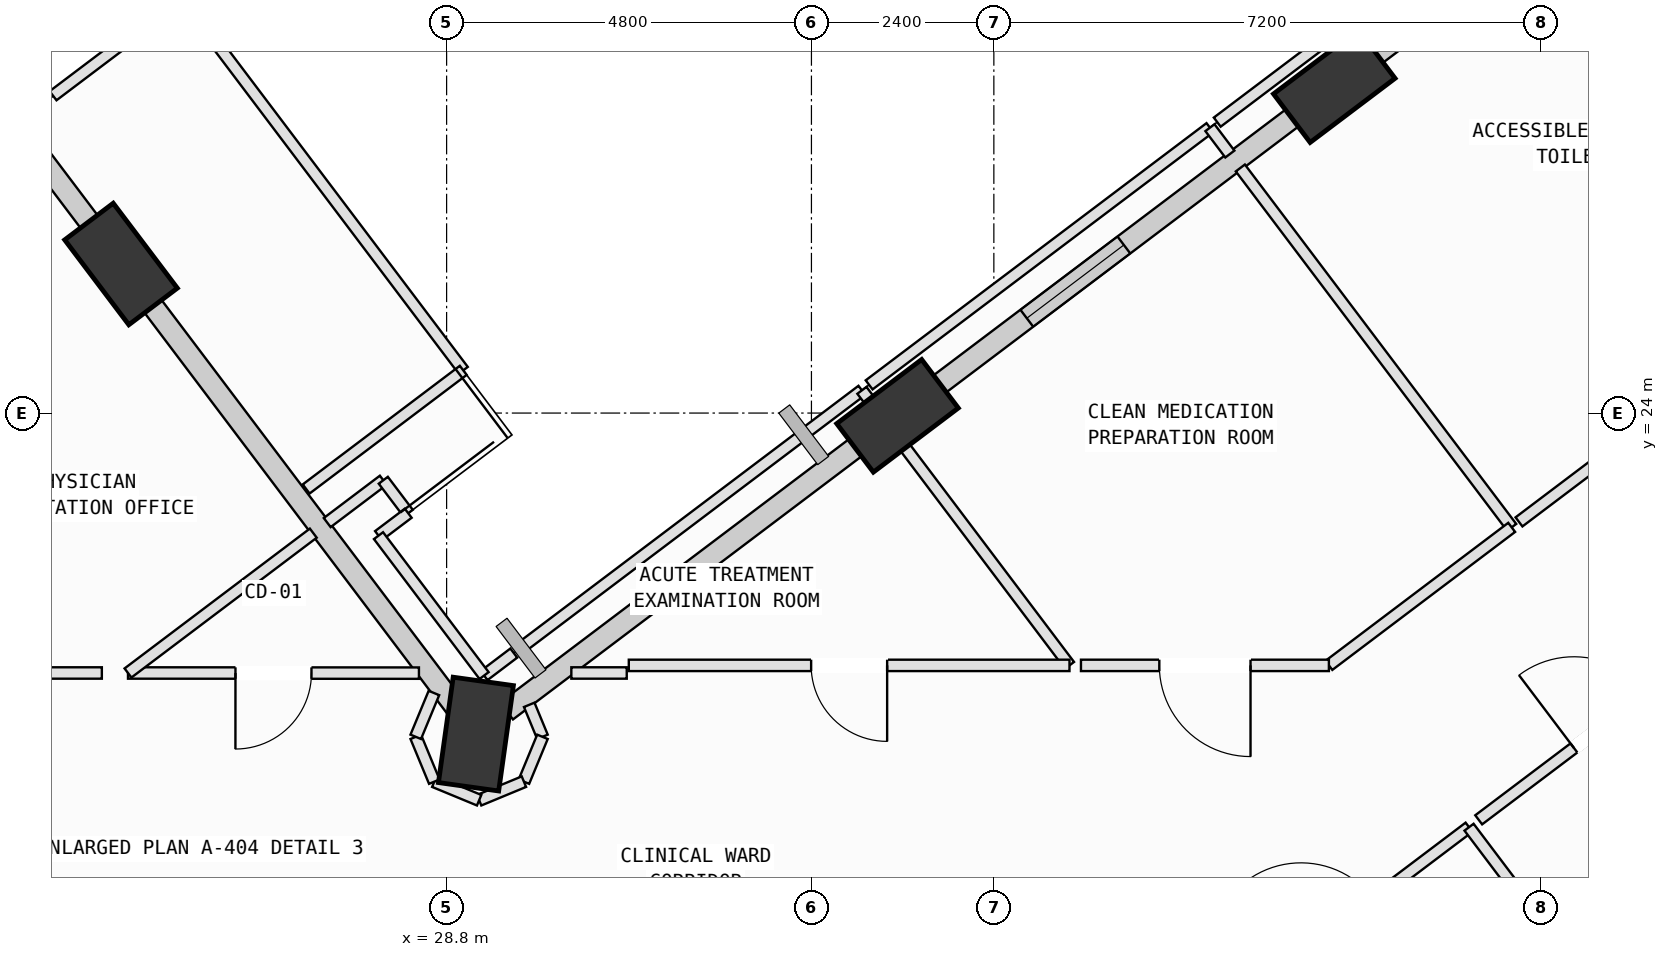
"""IFC4 building model, lengths in metres.
Left out: names, types, materials, properties, quantities, classifications, styles, units other than length and angle.
Written with IfcOpenShell. Run it as: python <this file> out.ifc"""

import sys

from ifc_helpers import new_model, si_unit, direction, frame, frame_2d, origin, origin_2d, place, context, subcontext, project, spatial, rectangle, extrude, element, fill, save


model = new_model("IFC4")
c1 = context("Model", 3, precision=1e-05, world=origin(), true_north=direction((0.0, 1.0)))
c2 = subcontext(c1, "Body", "Model", "MODEL_VIEW")
j1 = project(units=[si_unit("LENGTHUNIT", "METRE"), si_unit("PLANEANGLEUNIT", "RADIAN")], contexts=[c1])
p1 = place(None, origin())
s1 = spatial("IfcSite", under=j1, at=p1, CompositionType="ELEMENT")
p2 = place(p1, origin())
s2 = spatial("IfcBuilding", under=s1, at=p2, CompositionType="ELEMENT")
p3 = place(p2, frame((0.0, 0.0, 181.8)))
s3 = spatial("IfcBuildingStorey", under=s2, at=p3, CompositionType="ELEMENT", Elevation=181.8)
p4 = place(p3, frame((40.479, 28.302, 0.002), z_axis=(-0.014715421442, 0.028392825604, 0.999488521108), x_axis=(-0.431491023148, -0.90191143544, 0.019268097068)))
e1 = element("IfcColumn", 1, at=p4, inside=s3, PredefinedType="COLUMN", context=c2, shape_type="SweptSolid", body=[
    extrude(rectangle(XDim=1.4, YDim=0.8, at=origin_2d()), origin(), (0.0, 0.0, 1.0), 3.998),
])
p5 = place(p3, frame((34.733, 23.964, 0.002), z_axis=(0.003421042992, 0.004703934114, 0.999983084591), x_axis=(-0.999834730592, -0.017839011426, 0.003504450412)))
e2 = element("IfcColumn", 2, at=p5, inside=s3, PredefinedType="COLUMN", context=c2, shape_type="SweptSolid", body=[
    extrude(rectangle(XDim=1.4, YDim=0.8, at=origin_2d()), origin(), (0.0, 0.0, 1.0), 3.996),
])
p6 = place(p3, frame((29.186, 19.776, 0.002), z_axis=(0.020946197976, -0.018137086877, 0.999616077737), x_axis=(-0.657890555794, 0.752613449927, 0.027441056587)))
e3 = element("IfcColumn", 3, at=p6, inside=s3, PredefinedType="COLUMN", context=c2, shape_type="SweptSolid", body=[
    extrude(rectangle(XDim=1.4, YDim=0.8, at=origin_2d()), origin(), (0.0, 0.0, 1.0), 3.998),
])
p7 = place(p3, frame((24.516, 25.961, 0.002), z_axis=(-0.004517486263, -0.037666067894, 0.999280170747), x_axis=(-0.503252595216, 0.863608778527, 0.030277104545)))
e4 = element("IfcColumn", 4, at=p7, inside=s3, PredefinedType="COLUMN", context=c2, shape_type="SweptSolid", body=[
    extrude(rectangle(XDim=1.4, YDim=0.8, at=origin_2d()), origin(), (0.0, 0.0, 1.0), 3.999),
])
p8 = place(p3, frame((40.88, 28.604, 0.0), z_axis=(0.0, 0.0, 1.0), x_axis=(0.798099856312, 0.602525202257, 0.0)))
e5 = element("IfcWall", 5, at=p8, inside=s3, PredefinedType="SOLIDWALL", context=c2, shape_type="SweptSolid", body=[
    extrude(rectangle(XDim=6.227, YDim=0.28, at=frame_2d((3.113, 0.0))), origin(), (0.0, 0.0, 1.0), 3.065),
])
p9 = place(p8, frame((1.096, 0.0, 0.75)))
e6 = element("IfcOpeningElement", 6, at=p9, cuts=e5, PredefinedType="OPENING", context=c2, shape_type="SweptSolid", body=[
    extrude(rectangle(XDim=1.2, YDim=1.75, at=frame_2d((0.6, 0.875))), frame((0.0, 0.15, 0.0), z_axis=(0.0, -1.0, 0.0), x_axis=(1.0, 0.0, 0.0)), (0.0, 0.0, 1.0), 0.3),
])
p10 = place(p3, frame((35.138, 24.269, 0.0), z_axis=(0.0, 0.0, 1.0), x_axis=(0.798109261366, 0.602512744199, 0.0)))
e7 = element("IfcWall", 7, at=p10, inside=s3, PredefinedType="SOLIDWALL", context=c2, shape_type="SweptSolid", body=[
    extrude(rectangle(XDim=6.211, YDim=0.28, at=frame_2d((3.105, 0.0))), origin(), (0.0, 0.0, 1.0), 3.265),
])
p11 = place(p10, frame((1.624, 0.0, 0.75)))
e8 = element("IfcOpeningElement", 8, at=p11, cuts=e7, PredefinedType="OPENING", context=c2, shape_type="SweptSolid", body=[
    extrude(rectangle(XDim=1.6, YDim=1.95, at=frame_2d((0.8, 0.975))), frame((0.0, 0.15, 0.0), z_axis=(0.0, -1.0, 0.0), x_axis=(1.0, 0.0, 0.0)), (0.0, 0.0, 1.0), 0.3),
])
p12 = place(p3, frame((29.589, 20.08, 0.0), z_axis=(0.0, 0.0, 1.0), x_axis=(0.798108500782, 0.602513751694, 0.0)))
e9 = element("IfcWall", 9, at=p12, inside=s3, PredefinedType="SOLIDWALL", context=c2, shape_type="SweptSolid", body=[
    extrude(rectangle(XDim=5.96, YDim=0.28, at=frame_2d((2.98, 0.0))), origin(), (0.0, 0.0, 1.0), 3.265),
])
p13 = place(p3, frame((28.919, 20.129, 0.0), z_axis=(0.0, 0.0, 1.0), x_axis=(-0.602505021185, 0.798115091604, 0.0)))
e10 = element("IfcWall", 10, at=p13, inside=s3, PredefinedType="SOLIDWALL", context=c2, shape_type="SweptSolid", body=[
    extrude(rectangle(XDim=6.76, YDim=0.28, at=frame_2d((3.38, 0.0))), origin(), (0.0, 0.0, 1.0), 3.265),
])
p14 = place(p3, frame((24.252, 26.312, 0.0), z_axis=(0.0, 0.0, 1.0), x_axis=(-0.602494218239, 0.798123246741, 0.0)))
e11 = element("IfcWall", 11, at=p14, inside=s3, PredefinedType="SOLIDWALL", context=c2, shape_type="SweptSolid", body=[
    extrude(rectangle(XDim=2.487, YDim=0.28, at=frame_2d((1.244, 0.0))), origin(), (0.0, 0.0, 1.0), 3.245),
])
p15 = place(p3, frame((38.788, 15.936, 0.0), z_axis=(0.0, 0.0, 1.0), x_axis=(0.798105957369, 0.602517120763, 0.0)))
e12 = element("IfcWall", 12, at=p15, inside=s3, PredefinedType="PARTITIONING", context=c2, shape_type="SweptSolid", body=[
    extrude(rectangle(XDim=4.34, YDim=0.15, at=frame_2d((2.17, 0.0))), origin(), (0.0, 0.0, 1.0), 3.78),
])
p16 = place(p15, frame((1.57, 0.0, 0.0)))
e13 = element("IfcOpeningElement", 13, at=p16, cuts=e12, PredefinedType="OPENING", context=c2, shape_type="SweptSolid", body=[
    extrude(rectangle(XDim=1.2, YDim=2.15, at=frame_2d((0.6, 1.075))), frame((0.0, 0.085, 0.0), z_axis=(0.0, -1.0, 0.0), x_axis=(1.0, 0.0, 0.0)), (0.0, 0.0, 1.0), 0.17),
])
p17 = place(p3, frame((42.252, 18.551, 0.0), z_axis=(0.0, 0.0, 1.0), x_axis=(0.602533536667, -0.798093564184, 0.0)))
e14 = element("IfcWall", 14, at=p17, inside=s3, PredefinedType="PARTITIONING", context=c2, shape_type="SweptSolid", body=[
    extrude(rectangle(XDim=11.935, YDim=0.15, at=frame_2d((5.967, 0.0))), origin(), (0.0, 0.0, 1.0), 3.78),
])
p18 = place(p3, frame((42.379, 18.648, 0.0), z_axis=(0.0, 0.0, 1.0), x_axis=(0.798234572406, 0.602346716946, 0.0)))
e15 = element("IfcWall", 15, at=p18, inside=s3, PredefinedType="PARTITIONING", context=c2, shape_type="SweptSolid", body=[
    extrude(rectangle(XDim=4.34, YDim=0.15, at=frame_2d((2.17, 0.0))), origin(), (0.0, 0.0, 1.0), 3.78),
])
p19 = place(p18, frame((1.57, 0.0, 0.0)))
e16 = element("IfcOpeningElement", 16, at=p19, cuts=e15, PredefinedType="OPENING", context=c2, shape_type="SweptSolid", body=[
    extrude(rectangle(XDim=1.2, YDim=2.15, at=frame_2d((0.6, 1.075))), frame((0.0, 0.085, 0.0), z_axis=(0.0, -1.0, 0.0), x_axis=(1.0, 0.0, 0.0)), (0.0, 0.0, 1.0), 0.17),
])
p20 = place(p3, frame((29.293, 20.546, 0.0), z_axis=(0.0, 0.0, 1.0), x_axis=(0.797244555245, 0.603656457873, 0.0)))
e17 = element("IfcWall", 17, at=p20, inside=s3, PredefinedType="PARTITIONING", context=c2, shape_type="SweptSolid", body=[
    extrude(rectangle(XDim=0.49, YDim=0.15, at=frame_2d((0.245, 0.0))), origin(), (0.0, 0.0, 1.0), 3.78),
])
p21 = place(p3, frame((29.887, 20.161, 0.0), z_axis=(0.0, 0.0, 1.0), x_axis=(0.382178193532, -0.924088647473, 0.0)))
e18 = element("IfcWall", 18, at=p21, inside=s3, PredefinedType="PARTITIONING", context=c2, shape_type="SweptSolid", body=[
    extrude(rectangle(XDim=0.456, YDim=0.15, at=frame_2d((0.228, 0.0))), origin(), (0.0, 0.0, 1.0), 3.78),
])
p22 = place(p3, frame((30.061, 19.74, 0.0), z_axis=(0.0, 0.0, 1.0), x_axis=(-0.382306769343, -0.924035461503, 0.0)))
e19 = element("IfcWall", 19, at=p22, inside=s3, PredefinedType="PARTITIONING", context=c2, shape_type="SweptSolid", body=[
    extrude(rectangle(XDim=0.639, YDim=0.15, at=frame_2d((0.319, 0.0))), origin(), (0.0, 0.0, 1.0), 3.78),
])
p23 = place(p3, frame((29.817, 19.15, 0.0), z_axis=(0.0, 0.0, 1.0), x_axis=(-0.923890787601, -0.382656259044, 0.0)))
e20 = element("IfcWall", 20, at=p23, inside=s3, PredefinedType="PARTITIONING", context=c2, shape_type="SweptSolid", body=[
    extrude(rectangle(XDim=0.637, YDim=0.15, at=frame_2d((0.319, 0.0))), origin(), (0.0, 0.0, 1.0), 3.415),
])
for number, where, z_axis, x_axis in (
    (21, (29.228, 18.906, 0.0), (0.0, 0.0, 1.0), (-0.924, 0.382, 0.0)),
    (22, (28.638, 19.15, 0.0), (0.0, 0.0, 1.0), (-0.382, 0.924, 0.0)),
):
    element("IfcWall", number, at=place(p3, frame(where, z_axis=z_axis, x_axis=x_axis)), inside=s3, PredefinedType="PARTITIONING", context=c2, shape_type="SweptSolid", body=[
        extrude(rectangle(XDim=0.638, YDim=0.15, at=frame_2d((0.319, 0.0))), origin(), (0.0, 0.0, 1.0), 3.78),
    ])
p24 = place(p3, frame((28.394, 19.74, 0.0), z_axis=(0.0, 0.0, 1.0), x_axis=(0.382754628836, 0.923850038753, 0.0)))
e23 = element("IfcWall", 23, at=p24, inside=s3, PredefinedType="PARTITIONING", context=c2, shape_type="SweptSolid", body=[
    extrude(rectangle(XDim=0.625, YDim=0.15, at=frame_2d((0.312, 0.0))), origin(), (0.0, 0.0, 1.0), 3.78),
])
p25 = place(p3, frame((28.436, 20.578, 0.0), z_axis=(0.0, 0.0, 1.0), x_axis=(-0.999999835274, 0.000573979497, 0.0)))
e24 = element("IfcWall", 24, at=p25, inside=s3, PredefinedType="PARTITIONING", context=c2, shape_type="SweptSolid", body=[
    extrude(rectangle(XDim=3.828, YDim=0.15, at=frame_2d((1.914, 0.0))), origin(), (0.0, 0.0, 1.0), 3.78),
])
p26 = place(p25, frame((1.414, 0.0, 0.0)))
e25 = element("IfcOpeningElement", 25, at=p26, cuts=e24, PredefinedType="OPENING", context=c2, shape_type="SweptSolid", body=[
    extrude(rectangle(XDim=1.0, YDim=2.12, at=frame_2d((0.5, 1.06))), frame((0.0, 0.085, 0.0), z_axis=(0.0, -1.0, 0.0), x_axis=(1.0, 0.0, 0.0)), (0.0, 0.0, 1.0), 0.17),
])
p27 = place(p3, frame((24.608, 20.58, 0.0), z_axis=(0.0, 0.0, 1.0), x_axis=(0.798212355552, 0.602376157765, 0.0)))
e26 = element("IfcWall", 26, at=p27, inside=s3, PredefinedType="PARTITIONING", context=c2, shape_type="SweptSolid", body=[
    extrude(rectangle(XDim=3.054, YDim=0.15, at=frame_2d((1.527, 0.0))), origin(), (0.0, 0.0, 1.0), 3.78),
])
p28 = place(p3, frame((27.229, 22.559, 0.0), z_axis=(0.0, 0.0, 1.0), x_axis=(0.798253828191, 0.602321198182, 0.0)))
e27 = element("IfcWall", 27, at=p28, inside=s3, PredefinedType="PARTITIONING", context=c2, shape_type="SweptSolid", body=[
    extrude(rectangle(XDim=0.925, YDim=0.15, at=frame_2d((0.462, 0.0))), origin(), (0.0, 0.0, 1.0), 3.78),
])
p29 = place(p3, frame((27.967, 23.116, 0.0), z_axis=(0.0, 0.0, 1.0), x_axis=(0.602725153945, -0.797948863525, 0.0)))
e28 = element("IfcWall", 28, at=p29, inside=s3, PredefinedType="PARTITIONING", context=c2, shape_type="SweptSolid", body=[
    extrude(rectangle(XDim=0.544, YDim=0.15, at=frame_2d((0.272, 0.0))), origin(), (0.0, 0.0, 1.0), 3.78),
])
p30 = place(p3, frame((28.295, 22.682, 0.0), z_axis=(0.0, 0.0, 1.0), x_axis=(-0.798261520433, -0.602311003549, 0.0)))
e29 = element("IfcWall", 29, at=p30, inside=s3, PredefinedType="PARTITIONING", context=c2, shape_type="SweptSolid", body=[
    extrude(rectangle(XDim=0.49, YDim=0.15, at=frame_2d((0.245, 0.0))), origin(), (0.0, 0.0, 1.0), 3.78),
])
p31 = place(p3, frame((27.904, 22.387, 0.0), z_axis=(0.0, 0.0, 1.0), x_axis=(0.602250369938, -0.798307266602, 0.0)))
e30 = element("IfcWall", 30, at=p31, inside=s3, PredefinedType="PARTITIONING", context=c2, shape_type="SweptSolid", body=[
    extrude(rectangle(XDim=2.306, YDim=0.15, at=frame_2d((1.153, 0.0))), origin(), (0.0, 0.0, 1.0), 3.78),
])
p32 = place(p3, frame((31.17, 20.58, 0.0), z_axis=(0.0, 0.0, 1.0), x_axis=(-1.0, 0.0, 0.0)))
e31 = element("IfcWall", 31, at=p32, inside=s3, PredefinedType="PARTITIONING", context=c2, shape_type="SweptSolid", body=[
    extrude(rectangle(XDim=0.729, YDim=0.15, at=frame_2d((0.365, 0.0))), origin(), (0.0, 0.0, 1.0), 3.78),
])
p33 = place(p3, frame((29.78, 20.914, 0.0), z_axis=(0.0, 0.0, 1.0), x_axis=(0.798108322746, 0.602513987525, 0.0)))
e32 = element("IfcWall", 32, at=p33, inside=s3, PredefinedType="PARTITIONING", context=c2, shape_type="SweptSolid", body=[
    extrude(rectangle(XDim=5.618, YDim=0.15, at=frame_2d((2.809, 0.0))), origin(), (0.0, 0.0, 1.0), 3.78),
])
p34 = place(p3, frame((34.264, 24.299, 0.0), z_axis=(0.0, 0.0, 1.0), x_axis=(0.602375188934, -0.798213086686, 0.0)))
e33 = element("IfcWall", 33, at=p34, inside=s3, PredefinedType="PARTITIONING", context=c2, shape_type="SweptSolid", body=[
    extrude(rectangle(XDim=4.534, YDim=0.15, at=frame_2d((2.267, 0.0))), origin(), (0.0, 0.0, 1.0), 3.78),
])
p35 = place(p3, frame((36.995, 20.68, 0.0), z_axis=(0.0, 0.0, 1.0), x_axis=(-1.0, 0.0, 0.0)))
e34 = element("IfcWall", 34, at=p35, inside=s3, PredefinedType="PARTITIONING", context=c2, shape_type="SweptSolid", body=[
    extrude(rectangle(XDim=5.798, YDim=0.15, at=frame_2d((2.899, 0.0))), origin(), (0.0, 0.0, 1.0), 3.415),
])
p36 = place(p35, frame((2.399, 0.0, 0.0)))
e35 = element("IfcOpeningElement", 35, at=p36, cuts=e34, PredefinedType="OPENING", context=c2, shape_type="SweptSolid", body=[
    extrude(rectangle(XDim=1.0, YDim=2.12, at=frame_2d((0.5, 1.06))), frame((0.0, 0.085, 0.0), z_axis=(0.0, -1.0, 0.0), x_axis=(1.0, 0.0, 0.0)), (0.0, 0.0, 1.0), 0.17),
])
p37 = place(p3, frame((34.359, 24.371, 0.0), z_axis=(0.0, 0.0, 1.0), x_axis=(0.798228577004, 0.602354662017, 0.0)))
e36 = element("IfcWall", 36, at=p37, inside=s3, PredefinedType="PARTITIONING", context=c2, shape_type="SweptSolid", body=[
    extrude(rectangle(XDim=5.618, YDim=0.15, at=frame_2d((2.809, 0.0))), origin(), (0.0, 0.0, 1.0), 3.78),
])
p38 = place(p3, frame((38.843, 27.755, 0.0), z_axis=(0.0, 0.0, 1.0), x_axis=(0.602602666336, -0.798041368931, 0.0)))
e37 = element("IfcWall", 37, at=p38, inside=s3, PredefinedType="PARTITIONING", context=c2, shape_type="SweptSolid", body=[
    extrude(rectangle(XDim=0.435, YDim=0.15, at=frame_2d((0.217, 0.0))), origin(), (0.0, 0.0, 1.0), 3.78),
])
p39 = place(p3, frame((39.243, 27.225, 0.0), z_axis=(0.0, 0.0, 1.0), x_axis=(0.602515370823, -0.798107278455, 0.0)))
e38 = element("IfcWall", 38, at=p39, inside=s3, PredefinedType="PARTITIONING", context=c2, shape_type="SweptSolid", body=[
    extrude(rectangle(XDim=5.925, YDim=0.15, at=frame_2d((2.963, 0.0))), origin(), (0.0, 0.0, 1.0), 3.78),
])
p40 = place(p3, frame((42.813, 22.496, 0.0), z_axis=(0.0, 0.0, 1.0), x_axis=(-0.798022287303, -0.602627935768, 0.0)))
e39 = element("IfcWall", 39, at=p40, inside=s3, PredefinedType="PARTITIONING", context=c2, shape_type="SweptSolid", body=[
    extrude(rectangle(XDim=3.014, YDim=0.15, at=frame_2d((1.507, 0.0))), origin(), (0.0, 0.0, 1.0), 3.78),
])
p41 = place(p3, frame((40.408, 20.68, 0.0), z_axis=(0.0, 0.0, 1.0), x_axis=(-1.0, 0.0, 0.0)))
e40 = element("IfcWall", 40, at=p41, inside=s3, PredefinedType="PARTITIONING", context=c2, shape_type="SweptSolid", body=[
    extrude(rectangle(XDim=3.262, YDim=0.15, at=frame_2d((1.631, 0.0))), origin(), (0.0, 0.0, 1.0), 3.78),
])
p42 = place(p41, frame((1.031, 0.0, 0.0)))
e41 = element("IfcOpeningElement", 41, at=p42, cuts=e40, PredefinedType="OPENING", context=c2, shape_type="SweptSolid", body=[
    extrude(rectangle(XDim=1.2, YDim=2.15, at=frame_2d((0.6, 1.075))), frame((0.0, 0.085, 0.0), z_axis=(0.0, -1.0, 0.0), x_axis=(1.0, 0.0, 0.0)), (0.0, 0.0, 1.0), 0.17),
])
p43 = place(p3, frame((47.392, 25.953, 0.0), z_axis=(0.0, 0.0, 1.0), x_axis=(-0.79808188884, -0.602549001083, 0.0)))
e42 = element("IfcWall", 42, at=p43, inside=s3, PredefinedType="PARTITIONING", context=c2, shape_type="SweptSolid", body=[
    extrude(rectangle(XDim=5.617, YDim=0.15, at=frame_2d((2.809, 0.0))), origin(), (0.0, 0.0, 1.0), 3.78),
])
p44 = place(p43, frame((2.349, 0.0, 0.0)))
e43 = element("IfcOpeningElement", 43, at=p44, cuts=e42, PredefinedType="OPENING", context=c2, shape_type="SweptSolid", body=[
    extrude(rectangle(XDim=0.92, YDim=2.1, at=frame_2d((0.46, 1.05))), frame((0.0, 0.085, 0.0), z_axis=(0.0, -1.0, 0.0), x_axis=(1.0, 0.0, 0.0)), (0.0, 0.0, 1.0), 0.17),
])
p45 = place(p3, frame((38.939, 27.828, 0.0), z_axis=(0.0, 0.0, 1.0), x_axis=(0.798144589063, 0.602465945053, 0.0)))
e44 = element("IfcWall", 44, at=p45, inside=s3, PredefinedType="PARTITIONING", context=c2, shape_type="SweptSolid", body=[
    extrude(rectangle(XDim=5.617, YDim=0.15, at=frame_2d((2.809, 0.0))), origin(), (0.0, 0.0, 1.0), 3.265),
])
p46 = place(p3, frame((43.822, 30.682, 0.0), z_axis=(0.0, 0.0, 1.0), x_axis=(0.602515370823, -0.798107278455, 0.0)))
e45 = element("IfcWall", 45, at=p46, inside=s3, PredefinedType="PARTITIONING", context=c2, shape_type="SweptSolid", body=[
    extrude(rectangle(XDim=5.925, YDim=0.15, at=frame_2d((2.963, 0.0))), origin(), (0.0, 0.0, 1.0), 3.78),
])
p47 = place(p3, frame((24.264, 20.58, 0.0), z_axis=(0.0, 0.0, 1.0), x_axis=(-1.0, 0.0, 0.0)))
e46 = element("IfcWall", 46, at=p47, inside=s3, PredefinedType="PARTITIONING", context=c2, shape_type="SweptSolid", body=[
    extrude(rectangle(XDim=1.073, YDim=0.15, at=frame_2d((0.537, 0.0))), origin(), (0.0, 0.0, 1.0), 3.78),
])
p48 = place(p3, frame((23.232, 28.576, 0.0), z_axis=(0.0, 0.0, 1.0), x_axis=(0.602110576482, -0.798412708872, 0.0)))
e47 = element("IfcWall", 47, at=p48, inside=s3, PredefinedType="PARTITIONING", context=c2, shape_type="SweptSolid", body=[
    extrude(rectangle(XDim=0.555, YDim=0.15, at=frame_2d((0.277, 0.0))), origin(), (0.0, 0.0, 1.0), 3.78),
])
p49 = place(p3, frame((23.622, 28.175, 0.0), z_axis=(0.0, 0.0, 1.0), x_axis=(0.797973879447, 0.602692033895, 0.0)))
e48 = element("IfcWall", 48, at=p49, inside=s3, PredefinedType="PARTITIONING", context=c2, shape_type="SweptSolid", body=[
    extrude(rectangle(XDim=2.13, YDim=0.15, at=frame_2d((1.065, 0.0))), origin(), (0.0, 0.0, 1.0), 3.78),
])
p50 = place(p3, frame((25.322, 29.459, 0.0), z_axis=(0.0, 0.0, 1.0), x_axis=(0.602530779128, -0.798095646025, 0.0)))
e49 = element("IfcWall", 49, at=p50, inside=s3, PredefinedType="PARTITIONING", context=c2, shape_type="SweptSolid", body=[
    extrude(rectangle(XDim=6.136, YDim=0.15, at=frame_2d((3.068, 0.0))), origin(), (0.0, 0.0, 1.0), 3.78),
])
p51 = place(p3, frame((29.019, 24.562, 0.0), z_axis=(0.0, 0.0, 1.0), x_axis=(-0.798016393194, -0.602635740886, 0.0)))
e50 = element("IfcWall", 50, at=p51, inside=s3, PredefinedType="PARTITIONING", context=c2, shape_type="SweptSolid", body=[
    extrude(rectangle(XDim=2.59, YDim=0.15, at=frame_2d((1.295, 0.0))), origin(), (0.0, 0.0, 1.0), 3.78),
])
p52 = place(p11, origin())
e51 = element("IfcWindow", 51, at=p52, inside=s3, PartitioningType="SINGLE_PANEL", PredefinedType="WINDOW", context=c2, shape_type="SweptSolid", body=[
    extrude(rectangle(XDim=1.6, YDim=1.95, at=frame_2d((0.8, 0.975))), frame((0.0, 0.03, 0.0), z_axis=(0.0, -1.0, 0.0), x_axis=(1.0, 0.0, 0.0)), (0.0, 0.0, 1.0), 0.06),
])
fill(e8, e51)
p53 = place(p19, origin())
e52 = element("IfcDoor", 52, at=p53, inside=s3, OperationType="SINGLE_SWING_LEFT", PredefinedType="DOOR", context=c2, shape_type="SweptSolid", body=[
    extrude(rectangle(XDim=1.2, YDim=2.15, at=frame_2d((0.6, 1.075))), frame((0.0, 0.025, 0.0), z_axis=(0.0, -1.0, 0.0), x_axis=(1.0, 0.0, 0.0)), (0.0, 0.0, 1.0), 0.05),
])
fill(e16, e52)
p54 = place(p26, origin())
e53 = element("IfcDoor", 53, at=p54, inside=s3, OperationType="SINGLE_SWING_RIGHT", PredefinedType="DOOR", context=c2, shape_type="SweptSolid", body=[
    extrude(rectangle(XDim=1.0, YDim=2.12, at=frame_2d((0.5, 1.06))), frame((0.0, 0.025, 0.0), z_axis=(0.0, -1.0, 0.0), x_axis=(1.0, 0.0, 0.0)), (0.0, 0.0, 1.0), 0.05),
])
fill(e25, e53)
p55 = place(p36, origin())
e54 = element("IfcDoor", 54, at=p55, inside=s3, OperationType="SINGLE_SWING_LEFT", PredefinedType="DOOR", context=c2, shape_type="SweptSolid", body=[
    extrude(rectangle(XDim=1.0, YDim=2.12, at=frame_2d((0.5, 1.06))), frame((0.0, 0.025, 0.0), z_axis=(0.0, -1.0, 0.0), x_axis=(1.0, 0.0, 0.0)), (0.0, 0.0, 1.0), 0.05),
])
fill(e35, e54)
p56 = place(p42, origin())
e55 = element("IfcDoor", 55, at=p56, inside=s3, OperationType="SINGLE_SWING_LEFT", PredefinedType="DOOR", context=c2, shape_type="SweptSolid", body=[
    extrude(rectangle(XDim=1.2, YDim=2.15, at=frame_2d((0.6, 1.075))), frame((0.0, 0.025, 0.0), z_axis=(0.0, -1.0, 0.0), x_axis=(1.0, 0.0, 0.0)), (0.0, 0.0, 1.0), 0.05),
])
fill(e41, e55)
save(model, sys.argv[1])
